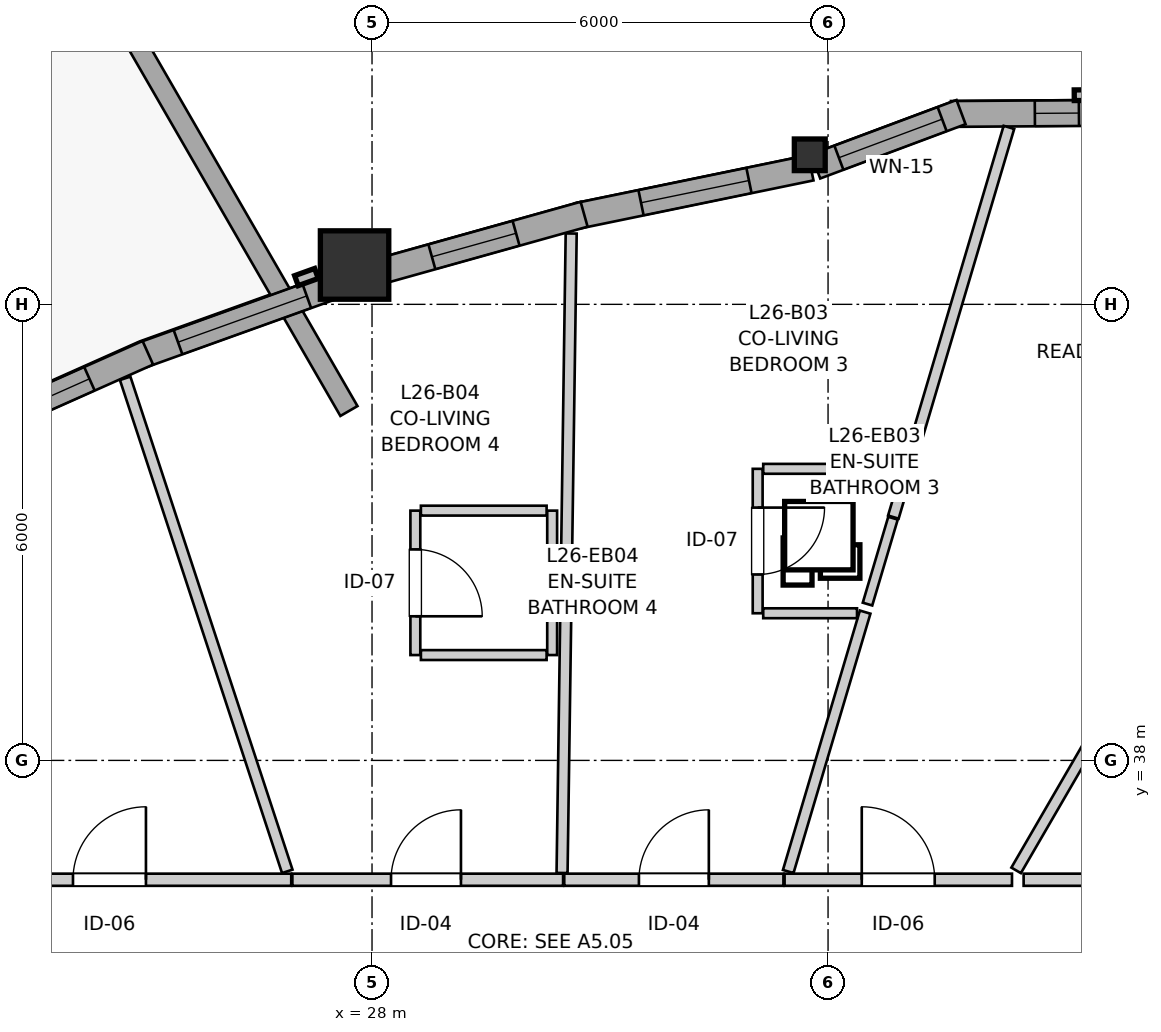
"""IFC4 building model, lengths in metres.
Left out: names, types, materials, properties, quantities, classifications, styles, units other than length and angle.
Written with IfcOpenShell. Run it as: python <this file> out.ifc"""

import sys

from ifc_helpers import new_model, si_unit, direction, frame, frame_2d, origin, origin_2d, place, context, subcontext, project, spatial, rectangle, i_section, extrude, source, transform, mapped, element, fill, save


model = new_model("IFC4")
c1 = context("Model", 3, precision=1e-05, world=origin(), true_north=direction((0.0, 1.0)))
c2 = subcontext(c1, "Body", "Model", "MODEL_VIEW")
j1 = project(units=[si_unit("LENGTHUNIT", "METRE"), si_unit("PLANEANGLEUNIT", "RADIAN")], contexts=[c1])
p1 = place(None, origin())
s1 = spatial("IfcSite", under=j1, at=p1, CompositionType="ELEMENT")
p2 = place(p1, origin())
s2 = spatial("IfcBuilding", under=s1, at=p2, CompositionType="ELEMENT")
p3 = place(p2, frame((0.0, 0.0, 89.6)))
s3 = spatial("IfcBuildingStorey", under=s2, at=p3, CompositionType="ELEMENT", Elevation=89.6)
m1 = source(origin(), c2, "Body", "SweptSolid", [
    extrude(i_section(OverallWidth=0.406, OverallDepth=0.416, WebThickness=0.027, FlangeThickness=0.044, FilletRadius=0.015, at=origin_2d()), origin(), (0.0, 0.0, 1.0), 2.95),
])
p4 = place(p3, frame((33.76, 45.968, 0.0), z_axis=(0.0, 0.0, 1.0), x_axis=(1.0, 0.0, 0.0)))
e1 = element("IfcColumn", 1, at=p4, inside=s3, PredefinedType="PILASTER", context=c2, shape_type="MappedRepresentation", body=[
    mapped(m1, transform((0.0, 0.0, 0.0), x_axis=(1.0, 0.0, 0.0), y_axis=(0.0, 1.0, 0.0), z_axis=(0.0, 0.0, 1.0), scale=1.0)),
])
m2 = source(origin(), c2, "Body", "SweptSolid", [
    extrude(rectangle(XDim=0.9, YDim=0.9, at=origin_2d()), origin(), (0.0, 0.0, 1.0), 2.95),
])
p5 = place(p3, frame((27.77, 44.517, 0.0), z_axis=(0.0, 0.0, 1.0), x_axis=(1.0, 0.0, 0.0)))
e2 = element("IfcColumn", 2, at=p5, inside=s3, PredefinedType="COLUMN", context=c2, shape_type="MappedRepresentation", body=[
    mapped(m2, transform((0.0, 0.0, 0.0), x_axis=(1.0, 0.0, 0.0), y_axis=(0.0, 1.0, 0.0), z_axis=(0.0, 0.0, 1.0), scale=1.0)),
])
p6 = place(p3, frame((27.696, 42.597, 0.0), z_axis=(0.0, 0.0, 1.0), x_axis=(-0.500010960134, 0.866019075856, 0.0)))
e3 = element("IfcWall", 3, at=p6, inside=s3, PredefinedType="PARAPET", context=c2, shape_type="SweptSolid", body=[
    extrude(rectangle(XDim=21.023, YDim=0.26, at=frame_2d((10.511, 0.0))), origin(), (0.0, 0.0, 1.0), 0.55),
])
p7 = place(p3, frame((37.717, 46.519, 0.0), z_axis=(0.0, 0.0, 1.0), x_axis=(-0.999976451414, -0.006862697526, 0.0)))
e4 = element("IfcWall", 4, at=p7, inside=s3, PredefinedType="SOLIDWALL", context=c2, shape_type="SweptSolid", body=[
    extrude(rectangle(XDim=2.099, YDim=0.34, at=frame_2d((1.049, 0.0))), origin(), (0.0, 0.0, 1.0), 2.48),
])
p8 = place(p7, frame((0.416, 0.0, 0.82)))
e5 = element("IfcOpeningElement", 5, at=p8, cuts=e4, PredefinedType="OPENING", context=c2, shape_type="SweptSolid", body=[
    extrude(rectangle(XDim=0.58, YDim=1.35, at=frame_2d((0.29, 0.675))), frame((0.0, 0.18, 0.0), z_axis=(0.0, -1.0, 0.0), x_axis=(1.0, 0.0, 0.0)), (0.0, 0.0, 1.0), 0.36),
])
p9 = place(p3, frame((35.75, 46.529, 0.0), z_axis=(0.0, 0.0, 1.0), x_axis=(-0.9368002254, -0.349864741994, 0.0)))
e6 = element("IfcWall", 6, at=p9, inside=s3, PredefinedType="SOLIDWALL", context=c2, shape_type="SweptSolid", body=[
    extrude(rectangle(XDim=2.041, YDim=0.34, at=frame_2d((1.021, 0.0))), origin(), (0.0, 0.0, 1.0), 2.48),
])
p10 = place(p9, frame((0.265, 0.0, 0.82)))
e7 = element("IfcOpeningElement", 7, at=p10, cuts=e6, PredefinedType="OPENING", context=c2, shape_type="SweptSolid", body=[
    extrude(rectangle(XDim=1.45, YDim=1.25, at=frame_2d((0.725, 0.625))), frame((0.0, 0.18, 0.0), z_axis=(0.0, -1.0, 0.0), x_axis=(1.0, 0.0, 0.0)), (0.0, 0.0, 1.0), 0.36),
])
p11 = place(p3, frame((33.774, 45.797, 0.0), z_axis=(0.0, 0.0, 1.0), x_axis=(-0.979428519707, -0.201791414051, 0.0)))
e8 = element("IfcWall", 8, at=p11, inside=s3, PredefinedType="SOLIDWALL", context=c2, shape_type="SweptSolid", body=[
    extrude(rectangle(XDim=3.134, YDim=0.34, at=frame_2d((1.567, 0.0))), origin(), (0.0, 0.0, 1.0), 2.48),
])
p12 = place(p11, frame((0.832, 0.0, 0.82)))
e9 = element("IfcOpeningElement", 9, at=p12, cuts=e8, PredefinedType="OPENING", context=c2, shape_type="SweptSolid", body=[
    extrude(rectangle(XDim=1.45, YDim=1.25, at=frame_2d((0.725, 0.625))), frame((0.0, 0.18, 0.0), z_axis=(0.0, -1.0, 0.0), x_axis=(1.0, 0.0, 0.0)), (0.0, 0.0, 1.0), 0.36),
])
p13 = place(p3, frame((30.79, 45.185, 0.0), z_axis=(0.0, 0.0, 1.0), x_axis=(-0.963052677404, -0.269313090187, 0.0)))
e10 = element("IfcWall", 10, at=p13, inside=s3, PredefinedType="SOLIDWALL", context=c2, shape_type="SweptSolid", body=[
    extrude(rectangle(XDim=2.858, YDim=0.34, at=frame_2d((1.429, 0.0))), origin(), (0.0, 0.0, 1.0), 2.48),
])
p14 = place(p13, frame((0.93, 0.0, 0.82)))
e11 = element("IfcOpeningElement", 11, at=p14, cuts=e10, PredefinedType="OPENING", context=c2, shape_type="SweptSolid", body=[
    extrude(rectangle(XDim=1.15, YDim=1.2, at=frame_2d((0.575, 0.6))), frame((0.0, 0.18, 0.0), z_axis=(0.0, -1.0, 0.0), x_axis=(1.0, 0.0, 0.0)), (0.0, 0.0, 1.0), 0.36),
])
p15 = place(p3, frame((27.611, 44.28, 0.0), z_axis=(0.0, 0.0, 1.0), x_axis=(-0.94110108123, -0.338125353836, 0.0)))
e12 = element("IfcWall", 12, at=p15, inside=s3, PredefinedType="SOLIDWALL", context=c2, shape_type="SweptSolid", body=[
    extrude(rectangle(XDim=2.809, YDim=0.34, at=frame_2d((1.404, 0.0))), origin(), (0.0, 0.0, 1.0), 2.48),
])
p16 = place(p15, frame((0.499, 0.0, 0.82)))
e13 = element("IfcOpeningElement", 13, at=p16, cuts=e12, PredefinedType="OPENING", context=c2, shape_type="SweptSolid", body=[
    extrude(rectangle(XDim=1.8, YDim=1.45, at=frame_2d((0.9, 0.725))), frame((0.0, 0.18, 0.0), z_axis=(0.0, -1.0, 0.0), x_axis=(1.0, 0.0, 0.0)), (0.0, 0.0, 1.0), 0.36),
])
p17 = place(p3, frame((25.05, 43.363, 0.0), z_axis=(0.0, 0.0, 1.0), x_axis=(-0.913433400489, -0.406988234315, 0.0)))
e14 = element("IfcWall", 14, at=p17, inside=s3, PredefinedType="SOLIDWALL", context=c2, shape_type="SweptSolid", body=[
    extrude(rectangle(XDim=2.985, YDim=0.34, at=frame_2d((1.492, 0.0))), origin(), (0.0, 0.0, 1.0), 2.48),
])
p18 = place(p17, frame((0.841, 0.0, 0.82)))
e15 = element("IfcOpeningElement", 15, at=p18, cuts=e14, PredefinedType="OPENING", context=c2, shape_type="SweptSolid", body=[
    extrude(rectangle(XDim=1.65, YDim=1.45, at=frame_2d((0.825, 0.725))), frame((0.0, 0.18, 0.0), z_axis=(0.0, -1.0, 0.0), x_axis=(1.0, 0.0, 0.0)), (0.0, 0.0, 1.0), 0.36),
])
p19 = place(p3, frame((22.17, 36.43, 0.0), z_axis=(0.0, 0.0, 1.0), x_axis=(1.0, 0.0, 0.0)))
e16 = element("IfcWall", 16, at=p19, inside=s3, PredefinedType="PARTITIONING", context=c2, shape_type="SweptSolid", body=[
    extrude(rectangle(XDim=4.767, YDim=0.16, at=frame_2d((2.384, 0.0))), origin(), (0.0, 0.0, 1.0), 2.588),
])
p20 = place(p19, frame((1.896, 0.0, 0.0)))
e17 = element("IfcOpeningElement", 17, at=p20, cuts=e16, PredefinedType="OPENING", context=c2, shape_type="SweptSolid", body=[
    extrude(rectangle(XDim=0.96, YDim=2.1, at=frame_2d((0.48, 1.05))), frame((0.0, 0.09, 0.0), z_axis=(0.0, -1.0, 0.0), x_axis=(1.0, 0.0, 0.0)), (0.0, 0.0, 1.0), 0.18),
])
p21 = place(p3, frame((26.952, 36.43, 0.0), z_axis=(0.0, 0.0, 1.0), x_axis=(1.0, 0.0, 0.0)))
e18 = element("IfcWall", 18, at=p21, inside=s3, PredefinedType="PARTITIONING", context=c2, shape_type="SweptSolid", body=[
    extrude(rectangle(XDim=3.562, YDim=0.16, at=frame_2d((1.781, 0.0))), origin(), (0.0, 0.0, 1.0), 2.95),
])
p22 = place(p21, frame((1.298, 0.0, 0.0)))
e19 = element("IfcOpeningElement", 19, at=p22, cuts=e18, PredefinedType="OPENING", context=c2, shape_type="SweptSolid", body=[
    extrude(rectangle(XDim=0.92, YDim=2.1, at=frame_2d((0.46, 1.05))), frame((0.0, 0.09, 0.0), z_axis=(0.0, -1.0, 0.0), x_axis=(1.0, 0.0, 0.0)), (0.0, 0.0, 1.0), 0.18),
])
p23 = place(p3, frame((33.428, 36.43, 0.0), z_axis=(0.0, 0.0, 1.0), x_axis=(1.0, 0.0, 0.0)))
e20 = element("IfcWall", 20, at=p23, inside=s3, PredefinedType="PARTITIONING", context=c2, shape_type="SweptSolid", body=[
    extrude(rectangle(XDim=2.992, YDim=0.16, at=frame_2d((1.496, 0.0))), origin(), (0.0, 0.0, 1.0), 2.95),
])
p24 = place(p23, frame((1.015, 0.0, 0.0)))
e21 = element("IfcOpeningElement", 21, at=p24, cuts=e20, PredefinedType="OPENING", context=c2, shape_type="SweptSolid", body=[
    extrude(rectangle(XDim=0.96, YDim=2.1, at=frame_2d((0.48, 1.05))), frame((0.0, 0.09, 0.0), z_axis=(0.0, -1.0, 0.0), x_axis=(1.0, 0.0, 0.0)), (0.0, 0.0, 1.0), 0.18),
])
p25 = place(p3, frame((30.529, 36.43, 0.0), z_axis=(0.0, 0.0, 1.0), x_axis=(1.0, 0.0, 0.0)))
e22 = element("IfcWall", 22, at=p25, inside=s3, PredefinedType="PARTITIONING", context=c2, shape_type="SweptSolid", body=[
    extrude(rectangle(XDim=2.884, YDim=0.16, at=frame_2d((1.442, 0.0))), origin(), (0.0, 0.0, 1.0), 2.95),
])
p26 = place(p25, frame((0.982, 0.0, 0.0)))
e23 = element("IfcOpeningElement", 23, at=p26, cuts=e22, PredefinedType="OPENING", context=c2, shape_type="SweptSolid", body=[
    extrude(rectangle(XDim=0.92, YDim=2.1, at=frame_2d((0.46, 1.05))), frame((0.0, 0.09, 0.0), z_axis=(0.0, -1.0, 0.0), x_axis=(1.0, 0.0, 0.0)), (0.0, 0.0, 1.0), 0.18),
])
p27 = place(p3, frame((33.074, 41.836, 0.0), z_axis=(0.0, 0.0, 1.0), x_axis=(0.0, -1.0, 0.0)))
e24 = element("IfcWall", 24, at=p27, inside=s3, PredefinedType="PARTITIONING", context=c2, shape_type="SweptSolid", body=[
    extrude(rectangle(XDim=1.9, YDim=0.13, at=frame_2d((0.95, 0.0))), origin(), (0.0, 0.0, 1.0), 2.95),
])
p28 = place(p27, frame((0.51, 0.0, 0.0)))
e25 = element("IfcOpeningElement", 25, at=p28, cuts=e24, PredefinedType="OPENING", context=c2, shape_type="SweptSolid", body=[
    extrude(rectangle(XDim=0.88, YDim=2.05, at=frame_2d((0.44, 1.025))), frame((0.0, 0.075, 0.0), z_axis=(0.0, -1.0, 0.0), x_axis=(1.0, 0.0, 0.0)), (0.0, 0.0, 1.0), 0.15),
])
p29 = place(p3, frame((28.57, 41.286, 0.0), z_axis=(0.0, 0.0, 1.0), x_axis=(0.0, -1.0, 0.0)))
e26 = element("IfcWall", 26, at=p29, inside=s3, PredefinedType="PARTITIONING", context=c2, shape_type="SweptSolid", body=[
    extrude(rectangle(XDim=1.9, YDim=0.13, at=frame_2d((0.95, 0.0))), origin(), (0.0, 0.0, 1.0), 2.368),
])
p30 = place(p29, frame((0.51, 0.0, 0.0)))
e27 = element("IfcOpeningElement", 27, at=p30, cuts=e26, PredefinedType="OPENING", context=c2, shape_type="SweptSolid", body=[
    extrude(rectangle(XDim=0.88, YDim=2.05, at=frame_2d((0.44, 1.025))), frame((0.0, 0.075, 0.0), z_axis=(0.0, -1.0, 0.0), x_axis=(1.0, 0.0, 0.0)), (0.0, 0.0, 1.0), 0.15),
])
p31 = place(p3, frame((36.475, 36.553, 0.0), z_axis=(0.0, 0.0, 1.0), x_axis=(0.501895508122, 0.864928262301, 0.0)))
e28 = element("IfcWall", 28, at=p31, inside=s3, PredefinedType="PARTITIONING", context=c2, shape_type="SweptSolid", body=[
    extrude(rectangle(XDim=8.958, YDim=0.145, at=frame_2d((4.479, 0.0))), origin(), (0.0, 0.0, 1.0), 2.95),
])
p32 = place(p3, frame((30.5, 36.519, 0.0), z_axis=(0.0, 0.0, 1.0), x_axis=(0.014275968132, 0.999898093174, 0.0)))
e29 = element("IfcWall", 29, at=p32, inside=s3, PredefinedType="PARTITIONING", context=c2, shape_type="SweptSolid", body=[
    extrude(rectangle(XDim=8.414, YDim=0.145, at=frame_2d((4.207, 0.0))), origin(), (0.0, 0.0, 1.0), 2.95),
])
p33 = place(p3, frame((24.752, 43.027, 0.0), z_axis=(0.0, 0.0, 1.0), x_axis=(0.312342290808, -0.949969627606, 0.0)))
e30 = element("IfcWall", 30, at=p33, inside=s3, PredefinedType="PARTITIONING", context=c2, shape_type="SweptSolid", body=[
    extrude(rectangle(XDim=6.828, YDim=0.145, at=frame_2d((3.414, 0.0))), origin(), (0.0, 0.0, 1.0), 2.95),
])
p34 = place(p3, frame((34.859, 41.201, 0.0), z_axis=(0.0, 0.0, 1.0), x_axis=(0.284335435967, 0.958724861393, 0.0)))
e31 = element("IfcWall", 31, at=p34, inside=s3, PredefinedType="PARTITIONING", context=c2, shape_type="SweptSolid", body=[
    extrude(rectangle(XDim=5.348, YDim=0.145, at=frame_2d((2.674, 0.0))), origin(), (0.0, 0.0, 1.0), 2.95),
])
p35 = place(p3, frame((33.476, 36.538, 0.0), z_axis=(0.0, 0.0, 1.0), x_axis=(0.284300835747, 0.958735122332, 0.0)))
e32 = element("IfcWall", 32, at=p35, inside=s3, PredefinedType="PARTITIONING", context=c2, shape_type="SweptSolid", body=[
    extrude(rectangle(XDim=3.56, YDim=0.145, at=frame_2d((1.78, 0.0))), origin(), (0.0, 0.0, 1.0), 2.95),
])
p36 = place(p3, frame((36.573, 36.43, 0.0), z_axis=(0.0, 0.0, 1.0), x_axis=(1.0, 0.0, 0.0)))
e33 = element("IfcWall", 33, at=p36, inside=s3, PredefinedType="PARTITIONING", context=c2, shape_type="SweptSolid", body=[
    extrude(rectangle(XDim=1.869, YDim=0.16, at=frame_2d((0.934, 0.0))), origin(), (0.0, 0.0, 1.0), 2.588),
])
p37 = place(p3, frame((30.37, 39.386, 0.0), z_axis=(0.0, 0.0, 1.0), x_axis=(0.0, 1.0, 0.0)))
e34 = element("IfcWall", 34, at=p37, inside=s3, PredefinedType="PARTITIONING", context=c2, shape_type="SweptSolid", body=[
    extrude(rectangle(XDim=1.9, YDim=0.13, at=frame_2d((0.95, 0.0))), origin(), (0.0, 0.0, 1.0), 2.95),
])
p38 = place(p3, frame((33.147, 41.836, 0.0), z_axis=(0.0, 0.0, 1.0), x_axis=(1.0, 0.0, 0.0)))
e35 = element("IfcWall", 35, at=p38, inside=s3, PredefinedType="PARTITIONING", context=c2, shape_type="SweptSolid", body=[
    extrude(rectangle(XDim=1.727, YDim=0.13, at=frame_2d((0.864, 0.0))), origin(), (0.0, 0.0, 1.0), 2.95),
])
p39 = place(p3, frame((28.643, 41.286, 0.0), z_axis=(0.0, 0.0, 1.0), x_axis=(1.0, 0.0, 0.0)))
e36 = element("IfcWall", 36, at=p39, inside=s3, PredefinedType="PARTITIONING", context=c2, shape_type="SweptSolid", body=[
    extrude(rectangle(XDim=1.654, YDim=0.13, at=frame_2d((0.827, 0.0))), origin(), (0.0, 0.0, 1.0), 2.558),
])
p40 = place(p3, frame((28.643, 39.386, 0.0), z_axis=(0.0, 0.0, 1.0), x_axis=(1.0, 0.0, 0.0)))
e37 = element("IfcWall", 37, at=p40, inside=s3, PredefinedType="PARTITIONING", context=c2, shape_type="SweptSolid", body=[
    extrude(rectangle(XDim=1.654, YDim=0.13, at=frame_2d((0.827, 0.0))), origin(), (0.0, 0.0, 1.0), 2.95),
])
p41 = place(p3, frame((33.147, 39.936, 0.0), z_axis=(0.0, 0.0, 1.0), x_axis=(1.0, 0.0, 0.0)))
e38 = element("IfcWall", 38, at=p41, inside=s3, PredefinedType="PARTITIONING", context=c2, shape_type="SweptSolid", body=[
    extrude(rectangle(XDim=1.234, YDim=0.13, at=frame_2d((0.617, 0.0))), origin(), (0.0, 0.0, 1.0), 2.558),
])
p42 = place(p3, frame((34.519, 40.057, 0.0), z_axis=(0.0, 0.0, 1.0), x_axis=(0.284363334184, 0.958716586991, 0.0)))
e39 = element("IfcWall", 39, at=p42, inside=s3, PredefinedType="PARTITIONING", context=c2, shape_type="SweptSolid", body=[
    extrude(rectangle(XDim=1.179, YDim=0.13, at=frame_2d((0.589, 0.0))), origin(), (0.0, 0.0, 1.0), 2.95),
])
p43 = place(p3, frame((34.874, 41.477, 0.0), z_axis=(0.0, 0.0, 1.0), x_axis=(0.0, 1.0, 0.0)))
e40 = element("IfcWall", 40, at=p43, inside=s3, PredefinedType="PARTITIONING", context=c2, shape_type="SweptSolid", body=[
    extrude(rectangle(XDim=0.359, YDim=0.13, at=frame_2d((0.179, 0.0))), origin(), (0.0, 0.0, 1.0), 2.95),
])
m3 = source(origin(), c2, "Body", "SweptSolid", [
    extrude(rectangle(XDim=0.58, YDim=1.35, at=frame_2d((0.29, 0.675))), frame((0.0, 0.03, 0.0), z_axis=(0.0, -1.0, 0.0), x_axis=(1.0, 0.0, 0.0)), (0.0, 0.0, 1.0), 0.06),
])
p44 = place(p8, origin())
e41 = element("IfcWindow", 41, at=p44, inside=s3, PartitioningType="SINGLE_PANEL", PredefinedType="WINDOW", context=c2, shape_type="MappedRepresentation", body=[
    mapped(m3, transform((0.0, 0.0, 0.0), x_axis=(1.0, 0.0, 0.0), y_axis=(0.0, 1.0, 0.0), z_axis=(0.0, 0.0, 1.0), scale=1.0)),
])
fill(e5, e41)
m4 = source(origin(), c2, "Body", "SweptSolid", [
    extrude(rectangle(XDim=1.45, YDim=1.25, at=frame_2d((0.725, 0.625))), frame((0.0, 0.03, 0.0), z_axis=(0.0, -1.0, 0.0), x_axis=(1.0, 0.0, 0.0)), (0.0, 0.0, 1.0), 0.06),
])
p45 = place(p10, origin())
e42 = element("IfcWindow", 42, at=p45, inside=s3, PartitioningType="SINGLE_PANEL", PredefinedType="WINDOW", context=c2, shape_type="MappedRepresentation", body=[
    mapped(m4, transform((0.0, 0.0, 0.0), x_axis=(1.0, 0.0, 0.0), y_axis=(0.0, 1.0, 0.0), z_axis=(0.0, 0.0, 1.0), scale=1.0)),
])
fill(e7, e42)
p46 = place(p12, origin())
e43 = element("IfcWindow", 43, at=p46, inside=s3, PartitioningType="SINGLE_PANEL", PredefinedType="WINDOW", context=c2, shape_type="MappedRepresentation", body=[
    mapped(m4, transform((0.0, 0.0, 0.0), x_axis=(1.0, 0.0, 0.0), y_axis=(0.0, 1.0, 0.0), z_axis=(0.0, 0.0, 1.0), scale=1.0)),
])
fill(e9, e43)
m5 = source(origin(), c2, "Body", "SweptSolid", [
    extrude(rectangle(XDim=1.15, YDim=1.2, at=frame_2d((0.575, 0.6))), frame((0.0, 0.03, 0.0), z_axis=(0.0, -1.0, 0.0), x_axis=(1.0, 0.0, 0.0)), (0.0, 0.0, 1.0), 0.06),
])
p47 = place(p14, origin())
e44 = element("IfcWindow", 44, at=p47, inside=s3, PartitioningType="SINGLE_PANEL", PredefinedType="WINDOW", context=c2, shape_type="MappedRepresentation", body=[
    mapped(m5, transform((0.0, 0.0, 0.0), x_axis=(1.0, 0.0, 0.0), y_axis=(0.0, 1.0, 0.0), z_axis=(0.0, 0.0, 1.0), scale=1.0)),
])
fill(e11, e44)
m6 = source(origin(), c2, "Body", "SweptSolid", [
    extrude(rectangle(XDim=1.8, YDim=1.45, at=frame_2d((0.9, 0.725))), frame((0.0, 0.03, 0.0), z_axis=(0.0, -1.0, 0.0), x_axis=(1.0, 0.0, 0.0)), (0.0, 0.0, 1.0), 0.06),
])
p48 = place(p16, origin())
e45 = element("IfcWindow", 45, at=p48, inside=s3, PartitioningType="SINGLE_PANEL", PredefinedType="WINDOW", context=c2, shape_type="MappedRepresentation", body=[
    mapped(m6, transform((0.0, 0.0, 0.0), x_axis=(1.0, 0.0, 0.0), y_axis=(0.0, 1.0, 0.0), z_axis=(0.0, 0.0, 1.0), scale=1.0)),
])
fill(e13, e45)
m7 = source(origin(), c2, "Body", "SweptSolid", [
    extrude(rectangle(XDim=1.65, YDim=1.45, at=frame_2d((0.825, 0.725))), frame((0.0, 0.03, 0.0), z_axis=(0.0, -1.0, 0.0), x_axis=(1.0, 0.0, 0.0)), (0.0, 0.0, 1.0), 0.06),
])
p49 = place(p18, origin())
e46 = element("IfcWindow", 46, at=p49, inside=s3, PartitioningType="SINGLE_PANEL", PredefinedType="WINDOW", context=c2, shape_type="MappedRepresentation", body=[
    mapped(m7, transform((0.0, 0.0, 0.0), x_axis=(1.0, 0.0, 0.0), y_axis=(0.0, 1.0, 0.0), z_axis=(0.0, 0.0, 1.0), scale=1.0)),
])
fill(e15, e46)
m8 = source(origin(), c2, "Body", "SweptSolid", [
    extrude(rectangle(XDim=0.96, YDim=2.1, at=frame_2d((0.48, 1.05))), frame((0.0, 0.025, 0.0), z_axis=(0.0, -1.0, 0.0), x_axis=(1.0, 0.0, 0.0)), (0.0, 0.0, 1.0), 0.05),
])
p50 = place(p20, origin())
e47 = element("IfcDoor", 47, at=p50, inside=s3, OperationType="SINGLE_SWING_RIGHT", PredefinedType="DOOR", context=c2, shape_type="MappedRepresentation", body=[
    mapped(m8, transform((0.0, 0.0, 0.0), x_axis=(1.0, 0.0, 0.0), y_axis=(0.0, 1.0, 0.0), z_axis=(0.0, 0.0, 1.0), scale=1.0)),
])
fill(e17, e47)
m9 = source(origin(), c2, "Body", "SweptSolid", [
    extrude(rectangle(XDim=0.92, YDim=2.1, at=frame_2d((0.46, 1.05))), frame((0.0, 0.025, 0.0), z_axis=(0.0, -1.0, 0.0), x_axis=(1.0, 0.0, 0.0)), (0.0, 0.0, 1.0), 0.05),
])
p51 = place(p22, origin())
e48 = element("IfcDoor", 48, at=p51, inside=s3, OperationType="SINGLE_SWING_RIGHT", PredefinedType="DOOR", context=c2, shape_type="MappedRepresentation", body=[
    mapped(m9, transform((0.0, 0.0, 0.0), x_axis=(1.0, 0.0, 0.0), y_axis=(0.0, 1.0, 0.0), z_axis=(0.0, 0.0, 1.0), scale=1.0)),
])
fill(e19, e48)
p52 = place(p24, origin())
e49 = element("IfcDoor", 49, at=p52, inside=s3, OperationType="SINGLE_SWING_LEFT", PredefinedType="DOOR", context=c2, shape_type="MappedRepresentation", body=[
    mapped(m8, transform((0.0, 0.0, 0.0), x_axis=(1.0, 0.0, 0.0), y_axis=(0.0, 1.0, 0.0), z_axis=(0.0, 0.0, 1.0), scale=1.0)),
])
fill(e21, e49)
p53 = place(p26, origin())
e50 = element("IfcDoor", 50, at=p53, inside=s3, OperationType="SINGLE_SWING_RIGHT", PredefinedType="DOOR", context=c2, shape_type="MappedRepresentation", body=[
    mapped(m9, transform((0.0, 0.0, 0.0), x_axis=(1.0, 0.0, 0.0), y_axis=(0.0, 1.0, 0.0), z_axis=(0.0, 0.0, 1.0), scale=1.0)),
])
fill(e23, e50)
m10 = source(origin(), c2, "Body", "SweptSolid", [
    extrude(rectangle(XDim=0.88, YDim=2.05, at=frame_2d((0.44, 1.025))), frame((0.0, 0.025, 0.0), z_axis=(0.0, -1.0, 0.0), x_axis=(1.0, 0.0, 0.0)), (0.0, 0.0, 1.0), 0.05),
])
p54 = place(p28, origin())
e51 = element("IfcDoor", 51, at=p54, inside=s3, OperationType="SINGLE_SWING_LEFT", PredefinedType="DOOR", context=c2, shape_type="MappedRepresentation", body=[
    mapped(m10, transform((0.0, 0.0, 0.0), x_axis=(1.0, 0.0, 0.0), y_axis=(0.0, 1.0, 0.0), z_axis=(0.0, 0.0, 1.0), scale=1.0)),
])
fill(e25, e51)
p55 = place(p30, origin())
e52 = element("IfcDoor", 52, at=p55, inside=s3, OperationType="SINGLE_SWING_RIGHT", PredefinedType="DOOR", context=c2, shape_type="MappedRepresentation", body=[
    mapped(m10, transform((0.0, 0.0, 0.0), x_axis=(1.0, 0.0, 0.0), y_axis=(0.0, 1.0, 0.0), z_axis=(0.0, 0.0, 1.0), scale=1.0)),
])
fill(e27, e52)
save(model, sys.argv[1])
